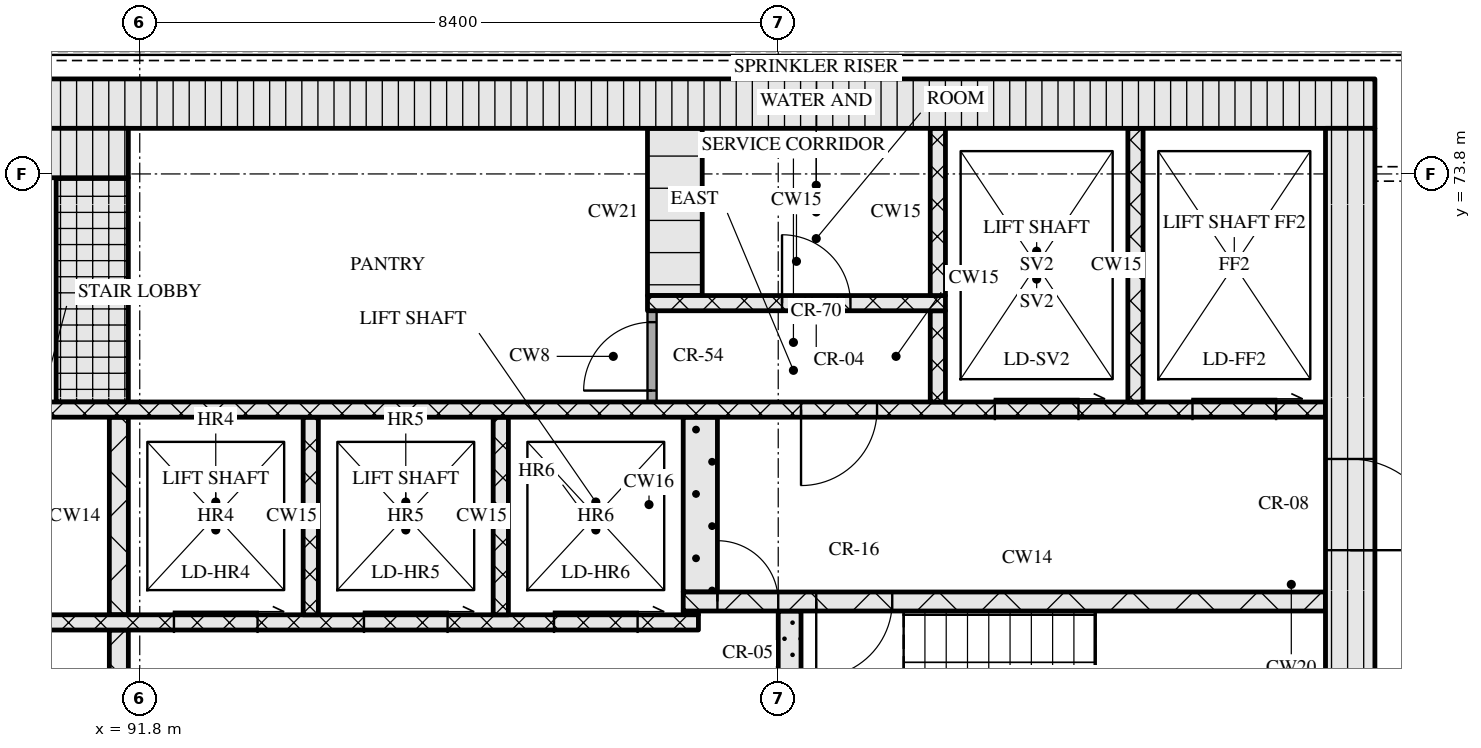
"""IFC4 building model, lengths in metres.
Left out: names, types, materials, properties, quantities, classifications, styles, units other than length and angle.
Written with IfcOpenShell. Run it as: python <this file> out.ifc"""

import sys

from ifc_helpers import new_model, si_unit, direction, frame, frame_2d, origin, place, context, subcontext, project, spatial, rectangle, extrude, element, fill, save


model = new_model("IFC4")
c1 = context("Model", 3, precision=1e-05, world=origin(), true_north=direction((0.0, 1.0)))
c2 = subcontext(c1, "Body", "Model", "MODEL_VIEW")
j1 = project(units=[si_unit("LENGTHUNIT", "METRE"), si_unit("PLANEANGLEUNIT", "RADIAN")], contexts=[c1])
p1 = place(None, origin())
s1 = spatial("IfcSite", under=j1, at=p1, CompositionType="ELEMENT")
p2 = place(p1, origin())
s2 = spatial("IfcBuilding", under=s1, at=p2, CompositionType="ELEMENT")
p3 = place(p2, frame((0.0, 0.0, 237.9)))
s3 = spatial("IfcBuildingStorey", under=s2, at=p3, CompositionType="ELEMENT", Elevation=237.9)
p4 = place(p3, frame((67.15, 74.725, 0.0), z_axis=(0.0, 0.0, 1.0), x_axis=(1.0, 0.0, 0.0)))
e1 = element("IfcWall", 1, at=p4, inside=s3, PredefinedType="SOLIDWALL", context=c2, shape_type="SweptSolid", body=[
    extrude(rectangle(XDim=40.9, YDim=0.65, at=frame_2d((20.45, 0.0))), origin(), (0.0, 0.0, 1.0), 3.32),
])
p5 = place(p3, frame((107.725, 62.4, 0.0), z_axis=(0.0, 0.0, 1.0), x_axis=(0.0, 1.0, 0.0)))
e2 = element("IfcWall", 2, at=p5, inside=s3, PredefinedType="SOLIDWALL", context=c2, shape_type="SweptSolid", body=[
    extrude(rectangle(XDim=12.0, YDim=0.65, at=frame_2d((6.0, 0.0))), origin(), (0.0, 0.0, 1.0), 3.32),
])
p6 = place(p5, frame((6.45, 0.0, 0.0)))
e3 = element("IfcOpeningElement", 3, at=p6, cuts=e2, PredefinedType="OPENING", context=c2, shape_type="SweptSolid", body=[
    extrude(rectangle(XDim=1.2, YDim=2.1, at=frame_2d((0.6, 1.05))), frame((0.0, 0.335, 0.0), z_axis=(0.0, -1.0, 0.0), x_axis=(1.0, 0.0, 0.0)), (0.0, 0.0, 1.0), 0.67),
])
p7 = place(p3, frame((91.525, 65.2, 0.0), z_axis=(0.0, 0.0, 1.0), x_axis=(0.0, 1.0, 0.0)))
e4 = element("IfcWall", 4, at=p7, inside=s3, PredefinedType="SOLIDWALL", context=c2, shape_type="SweptSolid", body=[
    extrude(rectangle(XDim=2.6, YDim=0.25, at=frame_2d((1.3, 0.0))), origin(), (0.0, 0.0, 1.0), 3.32),
])
p8 = place(p7, frame((0.7, 0.0, 0.0)))
e5 = element("IfcOpeningElement", 5, at=p8, cuts=e4, PredefinedType="OPENING", context=c2, shape_type="SweptSolid", body=[
    extrude(rectangle(XDim=1.2, YDim=2.1, at=frame_2d((0.6, 1.05))), frame((0.0, 0.135, 0.0), z_axis=(0.0, -1.0, 0.0), x_axis=(1.0, 0.0, 0.0)), (0.0, 0.0, 1.0), 0.27),
])
p9 = place(p3, frame((100.35, 65.2, 0.0), z_axis=(0.0, 0.0, 1.0), x_axis=(0.0, 1.0, 0.0)))
e6 = element("IfcWall", 6, at=p9, inside=s3, PredefinedType="SOLIDWALL", context=c2, shape_type="SweptSolid", body=[
    extrude(rectangle(XDim=2.85, YDim=0.3, at=frame_2d((1.425, 0.0))), origin(), (0.0, 0.0, 1.0), 3.32),
])
p10 = place(p3, frame((76.05, 67.9, 0.0), z_axis=(0.0, 0.0, 1.0), x_axis=(1.0, 0.0, 0.0)))
e7 = element("IfcWall", 7, at=p10, inside=s3, PredefinedType="SOLIDWALL", context=c2, shape_type="SweptSolid", body=[
    extrude(rectangle(XDim=23.1, YDim=0.2, at=frame_2d((11.55, 0.0))), origin(), (0.0, 0.0, 1.0), 3.32),
])
p11 = place(p10, frame((0.75, 0.0, 0.0)))
e8 = element("IfcOpeningElement", 8, at=p11, cuts=e7, PredefinedType="OPENING", context=c2, shape_type="SweptSolid", body=[
    extrude(rectangle(XDim=0.9, YDim=2.1, at=frame_2d((0.45, 1.05))), frame((0.0, 0.11, 0.0), z_axis=(0.0, -1.0, 0.0), x_axis=(1.0, 0.0, 0.0)), (0.0, 0.0, 1.0), 0.22),
])
p12 = place(p10, frame((3.32, 0.0, 0.0)))
e9 = element("IfcOpeningElement", 9, at=p12, cuts=e7, PredefinedType="OPENING", context=c2, shape_type="SweptSolid", body=[
    extrude(rectangle(XDim=0.9, YDim=2.1, at=frame_2d((0.45, 1.05))), frame((0.0, 0.11, 0.0), z_axis=(0.0, -1.0, 0.0), x_axis=(1.0, 0.0, 0.0)), (0.0, 0.0, 1.0), 0.22),
])
p13 = place(p10, frame((5.77, 0.0, 0.0)))
e10 = element("IfcOpeningElement", 10, at=p13, cuts=e7, PredefinedType="OPENING", context=c2, shape_type="SweptSolid", body=[
    extrude(rectangle(XDim=0.9, YDim=2.1, at=frame_2d((0.45, 1.05))), frame((0.0, 0.11, 0.0), z_axis=(0.0, -1.0, 0.0), x_axis=(1.0, 0.0, 0.0)), (0.0, 0.0, 1.0), 0.22),
])
p14 = place(p10, frame((8.45, 0.0, 0.0)))
e11 = element("IfcOpeningElement", 11, at=p14, cuts=e7, PredefinedType="OPENING", context=c2, shape_type="SweptSolid", body=[
    extrude(rectangle(XDim=0.9, YDim=2.1, at=frame_2d((0.45, 1.05))), frame((0.0, 0.11, 0.0), z_axis=(0.0, -1.0, 0.0), x_axis=(1.0, 0.0, 0.0)), (0.0, 0.0, 1.0), 0.22),
])
p15 = place(p10, frame((10.91, 0.0, 0.0)))
e12 = element("IfcOpeningElement", 12, at=p15, cuts=e7, PredefinedType="OPENING", context=c2, shape_type="SweptSolid", body=[
    extrude(rectangle(XDim=0.9, YDim=2.1, at=frame_2d((0.45, 1.05))), frame((0.0, 0.11, 0.0), z_axis=(0.0, -1.0, 0.0), x_axis=(1.0, 0.0, 0.0)), (0.0, 0.0, 1.0), 0.22),
])
p16 = place(p10, frame((13.55, 0.0, 0.0)))
e13 = element("IfcOpeningElement", 13, at=p16, cuts=e7, PredefinedType="OPENING", context=c2, shape_type="SweptSolid", body=[
    extrude(rectangle(XDim=1.0, YDim=2.1, at=frame_2d((0.5, 1.05))), frame((0.0, 0.11, 0.0), z_axis=(0.0, -1.0, 0.0), x_axis=(1.0, 0.0, 0.0)), (0.0, 0.0, 1.0), 0.22),
])
p17 = place(p10, frame((16.2, 0.0, 0.0)))
e14 = element("IfcOpeningElement", 14, at=p17, cuts=e7, PredefinedType="OPENING", context=c2, shape_type="SweptSolid", body=[
    extrude(rectangle(XDim=1.1, YDim=2.1, at=frame_2d((0.55, 1.05))), frame((0.0, 0.11, 0.0), z_axis=(0.0, -1.0, 0.0), x_axis=(1.0, 0.0, 0.0)), (0.0, 0.0, 1.0), 0.22),
])
p18 = place(p10, frame((18.7, 0.0, 0.0)))
e15 = element("IfcOpeningElement", 15, at=p18, cuts=e7, PredefinedType="OPENING", context=c2, shape_type="SweptSolid", body=[
    extrude(rectangle(XDim=1.1, YDim=2.1, at=frame_2d((0.55, 1.05))), frame((0.0, 0.11, 0.0), z_axis=(0.0, -1.0, 0.0), x_axis=(1.0, 0.0, 0.0)), (0.0, 0.0, 1.0), 0.22),
])
p19 = place(p10, frame((21.2, 0.0, 0.0)))
e16 = element("IfcOpeningElement", 16, at=p19, cuts=e7, PredefinedType="OPENING", context=c2, shape_type="SweptSolid", body=[
    extrude(rectangle(XDim=1.1, YDim=2.1, at=frame_2d((0.55, 1.05))), frame((0.0, 0.11, 0.0), z_axis=(0.0, -1.0, 0.0), x_axis=(1.0, 0.0, 0.0)), (0.0, 0.0, 1.0), 0.22),
])
p20 = place(p3, frame((91.525, 68.0, 0.0), z_axis=(0.0, 0.0, 1.0), x_axis=(0.0, 1.0, 0.0)))
e17 = element("IfcWall", 17, at=p20, inside=s3, PredefinedType="SOLIDWALL", context=c2, shape_type="SweptSolid", body=[
    extrude(rectangle(XDim=2.6, YDim=0.25, at=frame_2d((1.3, 0.0))), origin(), (0.0, 0.0, 1.0), 3.32),
])
for number, where, z_axis, x_axis in (
    (18, (94.05, 68.0, 0.0), (0.0, 0.0, 1.0), (0.0, 1.0, 0.0)),
    (19, (96.55, 68.0, 0.0), (0.0, 0.0, 1.0), (0.0, 1.0, 0.0)),
):
    element("IfcWall", number, at=place(p3, frame(where, z_axis=z_axis, x_axis=x_axis)), inside=s3, PredefinedType="SOLIDWALL", context=c2, shape_type="SweptSolid", body=[
        extrude(rectangle(XDim=2.6, YDim=0.2, at=frame_2d((1.3, 0.0))), origin(), (0.0, 0.0, 1.0), 3.32),
    ])
p21 = place(p3, frame((98.95, 68.025, 0.0), z_axis=(0.0, 0.0, 1.0), x_axis=(1.0, 0.0, 0.0)))
e20 = element("IfcWall", 20, at=p21, inside=s3, PredefinedType="SOLIDWALL", context=c2, shape_type="SweptSolid", body=[
    extrude(rectangle(XDim=0.2, YDim=0.05, at=frame_2d((0.1, 0.0))), origin(), (0.0, 0.0, 1.0), 3.32),
])
p22 = place(p3, frame((98.95, 68.175, 0.0), z_axis=(0.0, 0.0, 1.0), x_axis=(1.0, 0.0, 0.0)))
e21 = element("IfcWall", 21, at=p22, inside=s3, PredefinedType="SOLIDWALL", context=c2, shape_type="SweptSolid", body=[
    extrude(rectangle(XDim=8.45, YDim=0.25, at=frame_2d((4.225, 0.0))), origin(), (0.0, 0.0, 1.0), 3.32),
])
p23 = place(p22, frame((0.45, 0.0, 0.0)))
e22 = element("IfcOpeningElement", 22, at=p23, cuts=e21, PredefinedType="OPENING", context=c2, shape_type="SweptSolid", body=[
    extrude(rectangle(XDim=0.8, YDim=2.1, at=frame_2d((0.4, 1.05))), frame((0.0, 0.135, 0.0), z_axis=(0.0, -1.0, 0.0), x_axis=(1.0, 0.0, 0.0)), (0.0, 0.0, 1.0), 0.27),
])
p24 = place(p22, frame((1.75, 0.0, 0.0)))
e23 = element("IfcOpeningElement", 23, at=p24, cuts=e21, PredefinedType="OPENING", context=c2, shape_type="SweptSolid", body=[
    extrude(rectangle(XDim=1.0, YDim=2.1, at=frame_2d((0.5, 1.05))), frame((0.0, 0.135, 0.0), z_axis=(0.0, -1.0, 0.0), x_axis=(1.0, 0.0, 0.0)), (0.0, 0.0, 1.0), 0.27),
])
p25 = place(p3, frame((99.175, 68.3, 0.0), z_axis=(0.0, 0.0, 1.0), x_axis=(0.0, 1.0, 0.0)))
e24 = element("IfcWall", 24, at=p25, inside=s3, PredefinedType="SOLIDWALL", context=c2, shape_type="SweptSolid", body=[
    extrude(rectangle(XDim=2.3, YDim=0.45, at=frame_2d((1.15, 0.0))), origin(), (0.0, 0.0, 1.0), 3.32),
])
p26 = place(p3, frame((67.8, 70.7, 0.0), z_axis=(0.0, 0.0, 1.0), x_axis=(1.0, 0.0, 0.0)))
e25 = element("IfcWall", 25, at=p26, inside=s3, PredefinedType="SOLIDWALL", context=c2, shape_type="SweptSolid", body=[
    extrude(rectangle(XDim=39.6, YDim=0.2, at=frame_2d((19.8, 0.0))), origin(), (0.0, 0.0, 1.0), 3.32),
])
p27 = place(p26, frame((0.65, 0.0, 0.0)))
e26 = element("IfcOpeningElement", 26, at=p27, cuts=e25, PredefinedType="OPENING", context=c2, shape_type="SweptSolid", body=[
    extrude(rectangle(XDim=1.1, YDim=2.1, at=frame_2d((0.55, 1.05))), frame((0.0, 0.11, 0.0), z_axis=(0.0, -1.0, 0.0), x_axis=(1.0, 0.0, 0.0)), (0.0, 0.0, 1.0), 0.22),
])
p28 = place(p26, frame((3.25, 0.0, 0.0)))
e27 = element("IfcOpeningElement", 27, at=p28, cuts=e25, PredefinedType="OPENING", context=c2, shape_type="SweptSolid", body=[
    extrude(rectangle(XDim=1.1, YDim=2.1, at=frame_2d((0.55, 1.05))), frame((0.0, 0.11, 0.0), z_axis=(0.0, -1.0, 0.0), x_axis=(1.0, 0.0, 0.0)), (0.0, 0.0, 1.0), 0.22),
])
p29 = place(p26, frame((5.9, 0.0, 0.0)))
e28 = element("IfcOpeningElement", 28, at=p29, cuts=e25, PredefinedType="OPENING", context=c2, shape_type="SweptSolid", body=[
    extrude(rectangle(XDim=1.0, YDim=2.1, at=frame_2d((0.5, 1.05))), frame((0.0, 0.11, 0.0), z_axis=(0.0, -1.0, 0.0), x_axis=(1.0, 0.0, 0.0)), (0.0, 0.0, 1.0), 0.22),
])
p30 = place(p26, frame((21.7, 0.0, 0.0)))
e29 = element("IfcOpeningElement", 29, at=p30, cuts=e25, PredefinedType="OPENING", context=c2, shape_type="SweptSolid", body=[
    extrude(rectangle(XDim=1.0, YDim=2.1, at=frame_2d((0.5, 1.05))), frame((0.0, 0.11, 0.0), z_axis=(0.0, -1.0, 0.0), x_axis=(1.0, 0.0, 0.0)), (0.0, 0.0, 1.0), 0.22),
])
p31 = place(p26, frame((32.7, 0.0, 0.0)))
e30 = element("IfcOpeningElement", 30, at=p31, cuts=e25, PredefinedType="OPENING", context=c2, shape_type="SweptSolid", body=[
    extrude(rectangle(XDim=1.0, YDim=2.1, at=frame_2d((0.5, 1.05))), frame((0.0, 0.11, 0.0), z_axis=(0.0, -1.0, 0.0), x_axis=(1.0, 0.0, 0.0)), (0.0, 0.0, 1.0), 0.22),
])
p32 = place(p26, frame((35.25, 0.0, 0.0)))
e31 = element("IfcOpeningElement", 31, at=p32, cuts=e25, PredefinedType="OPENING", context=c2, shape_type="SweptSolid", body=[
    extrude(rectangle(XDim=1.1, YDim=2.1, at=frame_2d((0.55, 1.05))), frame((0.0, 0.11, 0.0), z_axis=(0.0, -1.0, 0.0), x_axis=(1.0, 0.0, 0.0)), (0.0, 0.0, 1.0), 0.22),
])
p33 = place(p26, frame((37.85, 0.0, 0.0)))
e32 = element("IfcOpeningElement", 32, at=p33, cuts=e25, PredefinedType="OPENING", context=c2, shape_type="SweptSolid", body=[
    extrude(rectangle(XDim=1.1, YDim=2.1, at=frame_2d((0.55, 1.05))), frame((0.0, 0.11, 0.0), z_axis=(0.0, -1.0, 0.0), x_axis=(1.0, 0.0, 0.0)), (0.0, 0.0, 1.0), 0.22),
])
p34 = place(p3, frame((91.175, 70.8, 0.0), z_axis=(0.0, 0.0, 1.0), x_axis=(0.0, 1.0, 0.0)))
e33 = element("IfcWall", 33, at=p34, inside=s3, PredefinedType="SOLIDWALL", context=c2, shape_type="SweptSolid", body=[
    extrude(rectangle(XDim=2.95, YDim=0.95, at=frame_2d((1.475, 0.0))), origin(), (0.0, 0.0, 1.0), 3.32),
])
p35 = place(p3, frame((98.54, 70.8, 0.0), z_axis=(0.0, 0.0, 1.0), x_axis=(0.0, 1.0, 0.0)))
e34 = element("IfcWall", 34, at=p35, inside=s3, PredefinedType="PARTITIONING", context=c2, shape_type="SweptSolid", body=[
    extrude(rectangle(XDim=1.2, YDim=0.12, at=frame_2d((0.6, 0.0))), origin(), (0.0, 0.0, 1.0), 3.32),
])
p36 = place(p35, frame((0.15, 0.0, 0.0)))
e35 = element("IfcOpeningElement", 35, at=p36, cuts=e34, PredefinedType="OPENING", context=c2, shape_type="SweptSolid", body=[
    extrude(rectangle(XDim=0.9, YDim=2.1, at=frame_2d((0.45, 1.05))), frame((0.0, 0.07, 0.0), z_axis=(0.0, -1.0, 0.0), x_axis=(1.0, 0.0, 0.0)), (0.0, 0.0, 1.0), 0.14),
])
p37 = place(p3, frame((102.3, 70.8, 0.0), z_axis=(0.0, 0.0, 1.0), x_axis=(0.0, 1.0, 0.0)))
e36 = element("IfcWall", 36, at=p37, inside=s3, PredefinedType="SOLIDWALL", context=c2, shape_type="SweptSolid", body=[
    extrude(rectangle(XDim=1.2, YDim=0.2, at=frame_2d((0.6, 0.0))), origin(), (0.0, 0.0, 1.0), 3.32),
])
p38 = place(p3, frame((104.9, 70.8, 0.0), z_axis=(0.0, 0.0, 1.0), x_axis=(0.0, 1.0, 0.0)))
e37 = element("IfcWall", 37, at=p38, inside=s3, PredefinedType="SOLIDWALL", context=c2, shape_type="SweptSolid", body=[
    extrude(rectangle(XDim=3.6, YDim=0.2, at=frame_2d((1.8, 0.0))), origin(), (0.0, 0.0, 1.0), 3.32),
])
p39 = place(p3, frame((98.48, 72.1, 0.0), z_axis=(0.0, 0.0, 1.0), x_axis=(1.0, 0.0, 0.0)))
e38 = element("IfcWall", 38, at=p39, inside=s3, PredefinedType="SOLIDWALL", context=c2, shape_type="SweptSolid", body=[
    extrude(rectangle(XDim=3.92, YDim=0.2, at=frame_2d((1.96, 0.0))), origin(), (0.0, 0.0, 1.0), 3.32),
])
p40 = place(p39, frame((1.77, 0.0, 0.0)))
e39 = element("IfcOpeningElement", 39, at=p40, cuts=e38, PredefinedType="OPENING", context=c2, shape_type="SweptSolid", body=[
    extrude(rectangle(XDim=0.9, YDim=2.1, at=frame_2d((0.45, 1.05))), frame((0.0, 0.11, 0.0), z_axis=(0.0, -1.0, 0.0), x_axis=(1.0, 0.0, 0.0)), (0.0, 0.0, 1.0), 0.22),
])
p41 = place(p3, frame((98.84, 72.2, 0.0), z_axis=(0.0, 0.0, 1.0), x_axis=(0.0, 1.0, 0.0)))
e40 = element("IfcWall", 40, at=p41, inside=s3, PredefinedType="SOLIDWALL", context=c2, shape_type="SweptSolid", body=[
    extrude(rectangle(XDim=2.2, YDim=0.72, at=frame_2d((1.1, 0.0))), origin(), (0.0, 0.0, 1.0), 3.32),
])
p42 = place(p3, frame((102.3, 72.2, 0.0), z_axis=(0.0, 0.0, 1.0), x_axis=(0.0, 1.0, 0.0)))
e41 = element("IfcWall", 41, at=p42, inside=s3, PredefinedType="SOLIDWALL", context=c2, shape_type="SweptSolid", body=[
    extrude(rectangle(XDim=2.2, YDim=0.2, at=frame_2d((1.1, 0.0))), origin(), (0.0, 0.0, 1.0), 3.32),
])
p43 = place(p3, frame((83.55, 74.075, 0.0), z_axis=(0.0, 0.0, 1.0), x_axis=(1.0, 0.0, 0.0)))
e42 = element("IfcWall", 42, at=p43, inside=s3, PredefinedType="SOLIDWALL", context=c2, shape_type="SweptSolid", body=[
    extrude(rectangle(XDim=8.1, YDim=0.65, at=frame_2d((4.05, 0.0))), origin(), (0.0, 0.0, 1.0), 3.32),
])
p44 = place(p17, origin())
e43 = element("IfcDoor", 43, at=p44, inside=s3, OperationType="SLIDING_TO_RIGHT", PredefinedType="DOOR", context=c2, shape_type="SweptSolid", body=[
    extrude(rectangle(XDim=1.1, YDim=2.1, at=frame_2d((0.55, 1.05))), frame((0.0, 0.025, 0.0), z_axis=(0.0, -1.0, 0.0), x_axis=(1.0, 0.0, 0.0)), (0.0, 0.0, 1.0), 0.05),
])
fill(e14, e43)
p45 = place(p18, origin())
e44 = element("IfcDoor", 44, at=p45, inside=s3, OperationType="SLIDING_TO_RIGHT", PredefinedType="DOOR", context=c2, shape_type="SweptSolid", body=[
    extrude(rectangle(XDim=1.1, YDim=2.1, at=frame_2d((0.55, 1.05))), frame((0.0, 0.025, 0.0), z_axis=(0.0, -1.0, 0.0), x_axis=(1.0, 0.0, 0.0)), (0.0, 0.0, 1.0), 0.05),
])
fill(e15, e44)
p46 = place(p19, origin())
e45 = element("IfcDoor", 45, at=p46, inside=s3, OperationType="SLIDING_TO_RIGHT", PredefinedType="DOOR", context=c2, shape_type="SweptSolid", body=[
    extrude(rectangle(XDim=1.1, YDim=2.1, at=frame_2d((0.55, 1.05))), frame((0.0, 0.025, 0.0), z_axis=(0.0, -1.0, 0.0), x_axis=(1.0, 0.0, 0.0)), (0.0, 0.0, 1.0), 0.05),
])
fill(e16, e45)
p47 = place(p23, origin())
e46 = element("IfcDoor", 46, at=p47, inside=s3, OperationType="SINGLE_SWING_LEFT", PredefinedType="DOOR", context=c2, shape_type="SweptSolid", body=[
    extrude(rectangle(XDim=0.8, YDim=2.1, at=frame_2d((0.4, 1.05))), frame((0.0, 0.025, 0.0), z_axis=(0.0, -1.0, 0.0), x_axis=(1.0, 0.0, 0.0)), (0.0, 0.0, 1.0), 0.05),
])
fill(e22, e46)
p48 = place(p24, origin())
e47 = element("IfcDoor", 47, at=p48, inside=s3, OperationType="SINGLE_SWING_RIGHT", PredefinedType="DOOR", context=c2, shape_type="SweptSolid", body=[
    extrude(rectangle(XDim=1.0, YDim=2.1, at=frame_2d((0.5, 1.05))), frame((0.0, 0.025, 0.0), z_axis=(0.0, -1.0, 0.0), x_axis=(1.0, 0.0, 0.0)), (0.0, 0.0, 1.0), 0.05),
])
fill(e23, e47)
p49 = place(p6, origin())
e48 = element("IfcDoor", 48, at=p49, inside=s3, OperationType="SINGLE_SWING_RIGHT", PredefinedType="DOOR", context=c2, shape_type="SweptSolid", body=[
    extrude(rectangle(XDim=1.2, YDim=2.1, at=frame_2d((0.6, 1.05))), frame((0.0, 0.025, 0.0), z_axis=(0.0, -1.0, 0.0), x_axis=(1.0, 0.0, 0.0)), (0.0, 0.0, 1.0), 0.05),
])
fill(e3, e48)
p50 = place(p31, origin())
e49 = element("IfcDoor", 49, at=p50, inside=s3, OperationType="SINGLE_SWING_RIGHT", PredefinedType="DOOR", context=c2, shape_type="SweptSolid", body=[
    extrude(rectangle(XDim=1.0, YDim=2.1, at=frame_2d((0.5, 1.05))), frame((0.0, 0.025, 0.0), z_axis=(0.0, -1.0, 0.0), x_axis=(1.0, 0.0, 0.0)), (0.0, 0.0, 1.0), 0.05),
])
fill(e30, e49)
p51 = place(p32, origin())
e50 = element("IfcDoor", 50, at=p51, inside=s3, OperationType="SLIDING_TO_RIGHT", PredefinedType="DOOR", context=c2, shape_type="SweptSolid", body=[
    extrude(rectangle(XDim=1.1, YDim=2.1, at=frame_2d((0.55, 1.05))), frame((0.0, 0.025, 0.0), z_axis=(0.0, -1.0, 0.0), x_axis=(1.0, 0.0, 0.0)), (0.0, 0.0, 1.0), 0.05),
])
fill(e31, e50)
p52 = place(p33, origin())
e51 = element("IfcDoor", 51, at=p52, inside=s3, OperationType="SLIDING_TO_RIGHT", PredefinedType="DOOR", context=c2, shape_type="SweptSolid", body=[
    extrude(rectangle(XDim=1.1, YDim=2.1, at=frame_2d((0.55, 1.05))), frame((0.0, 0.025, 0.0), z_axis=(0.0, -1.0, 0.0), x_axis=(1.0, 0.0, 0.0)), (0.0, 0.0, 1.0), 0.05),
])
fill(e32, e51)
p53 = place(p36, origin())
e52 = element("IfcDoor", 52, at=p53, inside=s3, OperationType="SINGLE_SWING_LEFT", PredefinedType="DOOR", context=c2, shape_type="SweptSolid", body=[
    extrude(rectangle(XDim=0.9, YDim=2.1, at=frame_2d((0.45, 1.05))), frame((0.0, 0.025, 0.0), z_axis=(0.0, -1.0, 0.0), x_axis=(1.0, 0.0, 0.0)), (0.0, 0.0, 1.0), 0.05),
])
fill(e35, e52)
p54 = place(p40, origin())
e53 = element("IfcDoor", 53, at=p54, inside=s3, OperationType="SINGLE_SWING_LEFT", PredefinedType="DOOR", context=c2, shape_type="SweptSolid", body=[
    extrude(rectangle(XDim=0.9, YDim=2.1, at=frame_2d((0.45, 1.05))), frame((0.0, 0.025, 0.0), z_axis=(0.0, -1.0, 0.0), x_axis=(1.0, 0.0, 0.0)), (0.0, 0.0, 1.0), 0.05),
])
fill(e39, e53)
save(model, sys.argv[1])
